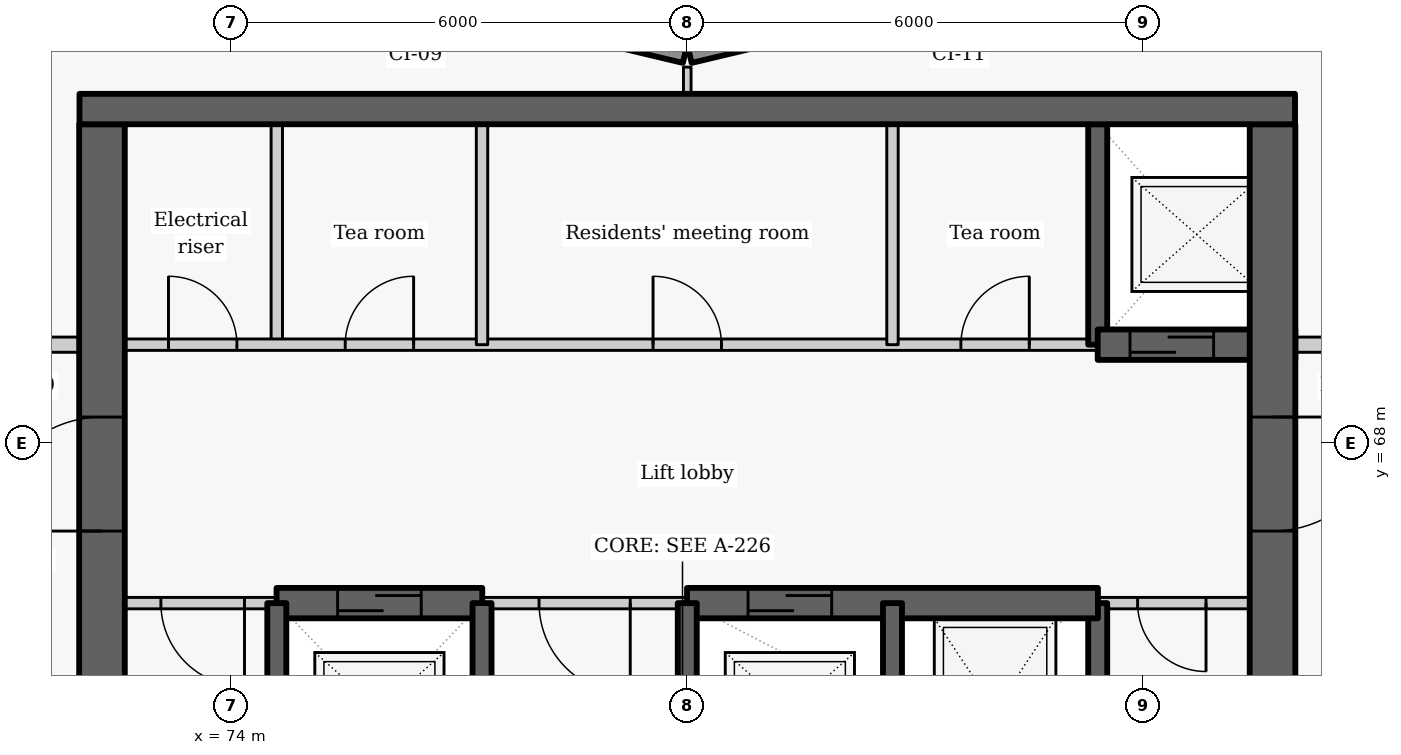
"""IFC4 building model, lengths in metres.
Left out: names, types, materials, properties, quantities, classifications, styles, units other than length and angle.
Written with IfcOpenShell. Run it as: python <this file> out.ifc"""

import sys

from ifc_helpers import new_model, si_unit, direction, frame, frame_2d, origin, place, context, subcontext, project, spatial, rectangle, extrude, element, fill, save


model = new_model("IFC4")
c1 = context("Model", 3, precision=1e-05, world=origin(), true_north=direction((0.0, 1.0)))
c2 = subcontext(c1, "Body", "Model", "MODEL_VIEW")
j1 = project(units=[si_unit("LENGTHUNIT", "METRE"), si_unit("PLANEANGLEUNIT", "RADIAN")], contexts=[c1])
p1 = place(None, origin())
s1 = spatial("IfcSite", under=j1, at=p1, CompositionType="ELEMENT")
p2 = place(p1, origin())
s2 = spatial("IfcBuilding", under=s1, at=p2, CompositionType="ELEMENT")
p3 = place(p2, frame((0.0, 0.0, 140.4)))
s3 = spatial("IfcBuildingStorey", under=s2, at=p3, CompositionType="ELEMENT", Elevation=140.4)
p4 = place(p3, frame((83.186, 73.881, 0.0), z_axis=(0.0, 0.0, 1.0), x_axis=(-0.972773113459, -0.231759508395, 0.0)))
e1 = element("IfcWall", 1, at=p4, inside=s3, PredefinedType="SOLIDWALL", context=c2, shape_type="SweptSolid", body=[
    extrude(rectangle(XDim=3.246, YDim=0.25, at=frame_2d((1.623, 0.0))), origin(), (0.0, 0.0, 1.0), 2.425),
])
p5 = place(p4, frame((0.573, 0.0, 0.9)))
e2 = element("IfcOpeningElement", 2, at=p5, cuts=e1, PredefinedType="OPENING", context=c2, shape_type="SweptSolid", body=[
    extrude(rectangle(XDim=2.1, YDim=1.1, at=frame_2d((1.05, 0.55))), frame((0.0, 0.135, 0.0), z_axis=(0.0, -1.0, 0.0), x_axis=(1.0, 0.0, 0.0)), (0.0, 0.0, 1.0), 0.27),
])
p6 = place(p3, frame((79.971, 73.128, 0.0), z_axis=(0.0, 0.0, 1.0), x_axis=(-0.972773113459, 0.231759508395, 0.0)))
e3 = element("IfcWall", 3, at=p6, inside=s3, PredefinedType="SOLIDWALL", context=c2, shape_type="SweptSolid", body=[
    extrude(rectangle(XDim=3.246, YDim=0.25, at=frame_2d((1.623, 0.0))), origin(), (0.0, 0.0, 1.0), 2.425),
])
p7 = place(p6, frame((0.573, 0.0, 0.9)))
e4 = element("IfcOpeningElement", 4, at=p7, cuts=e3, PredefinedType="OPENING", context=c2, shape_type="SweptSolid", body=[
    extrude(rectangle(XDim=2.1, YDim=1.1, at=frame_2d((1.05, 0.55))), frame((0.0, 0.135, 0.0), z_axis=(0.0, -1.0, 0.0), x_axis=(1.0, 0.0, 0.0)), (0.0, 0.0, 1.0), 0.27),
])
p8 = place(p3, frame((74.6, 69.3, 0.0), z_axis=(0.0, 0.0, 1.0), x_axis=(0.0, 1.0, 0.0)))
e5 = element("IfcWall", 5, at=p8, inside=s3, PredefinedType="PARTITIONING", context=c2, shape_type="SweptSolid", body=[
    extrude(rectangle(XDim=2.9, YDim=0.15, at=frame_2d((1.45, 0.0))), origin(), (0.0, 0.0, 1.0), 3.025),
])
p9 = place(p3, frame((72.0, 69.3, 0.0), z_axis=(0.0, 0.0, 1.0), x_axis=(1.0, 0.0, 0.0)))
e6 = element("IfcWall", 6, at=p9, inside=s3, PredefinedType="PARTITIONING", context=c2, shape_type="SweptSolid", body=[
    extrude(rectangle(XDim=13.4, YDim=0.15, at=frame_2d((6.7, 0.0))), origin(), (0.0, 0.0, 1.0), 3.025),
])
p10 = place(p9, frame((1.175, 0.0, 0.0)))
e7 = element("IfcOpeningElement", 7, at=p10, cuts=e6, PredefinedType="OPENING", context=c2, shape_type="SweptSolid", body=[
    extrude(rectangle(XDim=0.9, YDim=2.1, at=frame_2d((0.45, 1.05))), frame((0.0, 0.085, 0.0), z_axis=(0.0, -1.0, 0.0), x_axis=(1.0, 0.0, 0.0)), (0.0, 0.0, 1.0), 0.17),
])
p11 = place(p9, frame((3.5, 0.0, 0.0)))
e8 = element("IfcOpeningElement", 8, at=p11, cuts=e6, PredefinedType="OPENING", context=c2, shape_type="SweptSolid", body=[
    extrude(rectangle(XDim=0.9, YDim=2.1, at=frame_2d((0.45, 1.05))), frame((0.0, 0.085, 0.0), z_axis=(0.0, -1.0, 0.0), x_axis=(1.0, 0.0, 0.0)), (0.0, 0.0, 1.0), 0.17),
])
p12 = place(p9, frame((7.55, 0.0, 0.0)))
e9 = element("IfcOpeningElement", 9, at=p12, cuts=e6, PredefinedType="OPENING", context=c2, shape_type="SweptSolid", body=[
    extrude(rectangle(XDim=0.9, YDim=2.1, at=frame_2d((0.45, 1.05))), frame((0.0, 0.085, 0.0), z_axis=(0.0, -1.0, 0.0), x_axis=(1.0, 0.0, 0.0)), (0.0, 0.0, 1.0), 0.17),
])
p13 = place(p9, frame((11.6, 0.0, 0.0)))
e10 = element("IfcOpeningElement", 10, at=p13, cuts=e6, PredefinedType="OPENING", context=c2, shape_type="SweptSolid", body=[
    extrude(rectangle(XDim=0.9, YDim=2.1, at=frame_2d((0.45, 1.05))), frame((0.0, 0.085, 0.0), z_axis=(0.0, -1.0, 0.0), x_axis=(1.0, 0.0, 0.0)), (0.0, 0.0, 1.0), 0.17),
])
p14 = place(p3, frame((72.3, 63.1, -0.275), z_axis=(0.0, 0.0, 1.0), x_axis=(0.0, 1.0, 0.0)))
e11 = element("IfcWall", 11, at=p14, inside=s3, PredefinedType="SHEAR", context=c2, shape_type="SweptSolid", body=[
    extrude(rectangle(XDim=9.1, YDim=0.6, at=frame_2d((4.55, 0.0))), origin(), (0.0, 0.0, 1.0), 3.3),
])
p15 = place(p14, frame((3.748, 0.0, 0.275)))
e12 = element("IfcOpeningElement", 12, at=p15, cuts=e11, PredefinedType="OPENING", context=c2, shape_type="SweptSolid", body=[
    extrude(rectangle(XDim=1.5, YDim=2.1, at=frame_2d((0.75, 1.05))), frame((0.0, 0.31, 0.0), z_axis=(0.0, -1.0, 0.0), x_axis=(1.0, 0.0, 0.0)), (0.0, 0.0, 1.0), 0.62),
])
p16 = place(p3, frame((85.4, 63.1, -0.275), z_axis=(0.0, 0.0, 1.0), x_axis=(0.0, 1.0, 0.0)))
e13 = element("IfcWall", 13, at=p16, inside=s3, PredefinedType="SHEAR", context=c2, shape_type="SweptSolid", body=[
    extrude(rectangle(XDim=2.8, YDim=0.25, at=frame_2d((1.4, 0.0))), origin(), (0.0, 0.0, 1.0), 3.3),
])
p17 = place(p3, frame((85.4, 69.3, -0.275), z_axis=(0.0, 0.0, 1.0), x_axis=(0.0, 1.0, 0.0)))
e14 = element("IfcWall", 14, at=p17, inside=s3, PredefinedType="SHEAR", context=c2, shape_type="SweptSolid", body=[
    extrude(rectangle(XDim=2.9, YDim=0.25, at=frame_2d((1.45, 0.0))), origin(), (0.0, 0.0, 1.0), 3.3),
])
p18 = place(p3, frame((85.4, 69.3, -0.275), z_axis=(0.0, 0.0, 1.0), x_axis=(1.0, 0.0, 0.0)))
e15 = element("IfcWall", 15, at=p18, inside=s3, PredefinedType="SHEAR", context=c2, shape_type="SweptSolid", body=[
    extrude(rectangle(XDim=2.6, YDim=0.4, at=frame_2d((1.3, 0.0))), origin(), (0.0, 0.0, 1.0), 3.3),
])
p19 = place(p18, frame((0.425, 0.0, 0.275)))
e16 = element("IfcOpeningElement", 16, at=p19, cuts=e15, PredefinedType="OPENING", context=c2, shape_type="SweptSolid", body=[
    extrude(rectangle(XDim=1.1, YDim=2.1, at=frame_2d((0.55, 1.05))), frame((0.0, 0.21, 0.0), z_axis=(0.0, -1.0, 0.0), x_axis=(1.0, 0.0, 0.0)), (0.0, 0.0, 1.0), 0.42),
])
p20 = place(p3, frame((87.7, 72.2, -0.275), z_axis=(0.0, 0.0, 1.0), x_axis=(0.0, -1.0, 0.0)))
e17 = element("IfcWall", 17, at=p20, inside=s3, PredefinedType="SHEAR", context=c2, shape_type="SweptSolid", body=[
    extrude(rectangle(XDim=15.6, YDim=0.6, at=frame_2d((7.8, 0.0))), origin(), (0.0, 0.0, 1.0), 3.3),
])
p21 = place(p20, frame((3.852, 0.0, 0.275)))
e18 = element("IfcOpeningElement", 18, at=p21, cuts=e17, PredefinedType="OPENING", context=c2, shape_type="SweptSolid", body=[
    extrude(rectangle(XDim=1.5, YDim=2.1, at=frame_2d((0.75, 1.05))), frame((0.0, 0.31, 0.0), z_axis=(0.0, -1.0, 0.0), x_axis=(1.0, 0.0, 0.0)), (0.0, 0.0, 1.0), 0.62),
])
for number, where, z_axis, x_axis in (
    (19, (77.3, 69.3, 0.0), (0.0, 0.0, 1.0), (0.0, 1.0, 0.0)),
    (20, (82.7, 69.3, 0.0), (0.0, 0.0, 1.0), (0.0, 1.0, 0.0)),
):
    element("IfcWall", number, at=place(p3, frame(where, z_axis=z_axis, x_axis=x_axis)), inside=s3, PredefinedType="PARTITIONING", context=c2, shape_type="SweptSolid", body=[
        extrude(rectangle(XDim=2.9, YDim=0.15, at=frame_2d((1.45, 0.0))), origin(), (0.0, 0.0, 1.0), 3.025),
    ])
p22 = place(p3, frame((74.603, 65.9, 0.0), z_axis=(0.0, 0.0, 1.0), x_axis=(-1.0, 0.0, 0.0)))
e21 = element("IfcWall", 21, at=p22, inside=s3, PredefinedType="PARTITIONING", context=c2, shape_type="SweptSolid", body=[
    extrude(rectangle(XDim=2.603, YDim=0.15, at=frame_2d((1.302, 0.0))), origin(), (0.0, 0.0, 1.0), 3.025),
])
p23 = place(p22, frame((0.428, 0.0, 0.0)))
e22 = element("IfcOpeningElement", 22, at=p23, cuts=e21, PredefinedType="OPENING", context=c2, shape_type="SweptSolid", body=[
    extrude(rectangle(XDim=1.1, YDim=2.1, at=frame_2d((0.55, 1.05))), frame((0.0, 0.085, 0.0), z_axis=(0.0, -1.0, 0.0), x_axis=(1.0, 0.0, 0.0)), (0.0, 0.0, 1.0), 0.17),
])
p24 = place(p3, frame((80.003, 65.9, 0.0), z_axis=(0.0, 0.0, 1.0), x_axis=(-1.0, 0.0, 0.0)))
e23 = element("IfcWall", 23, at=p24, inside=s3, PredefinedType="PARTITIONING", context=c2, shape_type="SweptSolid", body=[
    extrude(rectangle(XDim=2.706, YDim=0.15, at=frame_2d((1.353, 0.0))), origin(), (0.0, 0.0, 1.0), 3.025),
])
p25 = place(p24, frame((0.753, 0.0, 0.0)))
e24 = element("IfcOpeningElement", 24, at=p25, cuts=e23, PredefinedType="OPENING", context=c2, shape_type="SweptSolid", body=[
    extrude(rectangle(XDim=1.2, YDim=2.1, at=frame_2d((0.6, 1.05))), frame((0.0, 0.085, 0.0), z_axis=(0.0, -1.0, 0.0), x_axis=(1.0, 0.0, 0.0)), (0.0, 0.0, 1.0), 0.17),
])
p26 = place(p3, frame((88.0, 65.9, 0.0), z_axis=(0.0, 0.0, 1.0), x_axis=(-1.0, 0.0, 0.0)))
e25 = element("IfcWall", 25, at=p26, inside=s3, PredefinedType="PARTITIONING", context=c2, shape_type="SweptSolid", body=[
    extrude(rectangle(XDim=2.603, YDim=0.15, at=frame_2d((1.302, 0.0))), origin(), (0.0, 0.0, 1.0), 3.025),
])
p27 = place(p26, frame((1.175, 0.0, 0.0)))
e26 = element("IfcOpeningElement", 26, at=p27, cuts=e25, PredefinedType="OPENING", context=c2, shape_type="SweptSolid", body=[
    extrude(rectangle(XDim=0.9, YDim=2.1, at=frame_2d((0.45, 1.05))), frame((0.0, 0.085, 0.0), z_axis=(0.0, -1.0, 0.0), x_axis=(1.0, 0.0, 0.0)), (0.0, 0.0, 1.0), 0.17),
])
p28 = place(p3, frame((74.597, 65.9, -0.275), z_axis=(0.0, 0.0, 1.0), x_axis=(1.0, 0.0, 0.0)))
e27 = element("IfcWall", 27, at=p28, inside=s3, PredefinedType="SHEAR", context=c2, shape_type="SweptSolid", body=[
    extrude(rectangle(XDim=2.706, YDim=0.4, at=frame_2d((1.353, 0.0))), origin(), (0.0, 0.0, 1.0), 3.3),
])
p29 = place(p28, frame((0.803, 0.0, 0.275)))
e28 = element("IfcOpeningElement", 28, at=p29, cuts=e27, PredefinedType="OPENING", context=c2, shape_type="SweptSolid", body=[
    extrude(rectangle(XDim=1.1, YDim=2.1, at=frame_2d((0.55, 1.05))), frame((0.0, 0.21, 0.0), z_axis=(0.0, -1.0, 0.0), x_axis=(1.0, 0.0, 0.0)), (0.0, 0.0, 1.0), 0.42),
])
p30 = place(p3, frame((79.997, 65.9, -0.275), z_axis=(0.0, 0.0, 1.0), x_axis=(1.0, 0.0, 0.0)))
e29 = element("IfcWall", 29, at=p30, inside=s3, PredefinedType="SHEAR", context=c2, shape_type="SweptSolid", body=[
    extrude(rectangle(XDim=5.406, YDim=0.4, at=frame_2d((2.703, 0.0))), origin(), (0.0, 0.0, 1.0), 3.3),
])
p31 = place(p30, frame((0.803, 0.0, 0.275)))
e30 = element("IfcOpeningElement", 30, at=p31, cuts=e29, PredefinedType="OPENING", context=c2, shape_type="SweptSolid", body=[
    extrude(rectangle(XDim=1.1, YDim=2.1, at=frame_2d((0.55, 1.05))), frame((0.0, 0.21, 0.0), z_axis=(0.0, -1.0, 0.0), x_axis=(1.0, 0.0, 0.0)), (0.0, 0.0, 1.0), 0.42),
])
for number, where, z_axis, x_axis in (
    (31, (74.6, 63.1, -0.275), (0.0, 0.0, 1.0), (0.0, 1.0, 0.0)),
    (32, (77.3, 63.1, -0.275), (0.0, 0.0, 1.0), (0.0, 1.0, 0.0)),
    (33, (80.0, 63.1, -0.275), (0.0, 0.0, 1.0), (0.0, 1.0, 0.0)),
    (34, (82.7, 63.1, -0.275), (0.0, 0.0, 1.0), (0.0, 1.0, 0.0)),
):
    element("IfcWall", number, at=place(p3, frame(where, z_axis=z_axis, x_axis=x_axis)), inside=s3, PredefinedType="SHEAR", context=c2, shape_type="SweptSolid", body=[
        extrude(rectangle(XDim=2.8, YDim=0.25, at=frame_2d((1.4, 0.0))), origin(), (0.0, 0.0, 1.0), 3.3),
    ])
for number, where, z_axis, x_axis in (
    (35, (70.45, 69.3, 0.0), (0.0, 0.0, 1.0), (1.0, 0.0, 0.0)),
    (36, (88.0, 69.3, 0.0), (0.0, 0.0, 1.0), (1.0, 0.0, 0.0)),
):
    element("IfcWall", number, at=place(p3, frame(where, z_axis=z_axis, x_axis=x_axis)), inside=s3, PredefinedType="PARTITIONING", context=c2, shape_type="SweptSolid", body=[
        extrude(rectangle(XDim=1.55, YDim=0.2, at=frame_2d((0.775, 0.0))), origin(), (0.0, 0.0, 1.0), 3.025),
    ])
p32 = place(p3, frame((80.0, 72.6, 0.0), z_axis=(0.0, 0.0, 1.0), x_axis=(0.0, 1.0, 0.0)))
e37 = element("IfcWall", 37, at=p32, inside=s3, PredefinedType="PARTITIONING", context=c2, shape_type="SweptSolid", body=[
    extrude(rectangle(XDim=0.352, YDim=0.1, at=frame_2d((0.176, 0.0))), origin(), (0.0, 0.0, 1.0), 3.025),
])
p33 = place(p3, frame((72.004, 72.4, -0.275), z_axis=(0.0, 0.0, 1.0), x_axis=(1.0, 0.0, 0.0)))
e38 = element("IfcWall", 38, at=p33, inside=s3, PredefinedType="SHEAR", context=c2, shape_type="SweptSolid", body=[
    extrude(rectangle(XDim=15.992, YDim=0.4, at=frame_2d((7.996, 0.0))), origin(), (0.0, 0.0, 1.0), 3.3),
])
p34 = place(p10, origin())
e39 = element("IfcDoor", 39, at=p34, inside=s3, OperationType="SINGLE_SWING_LEFT", PredefinedType="DOOR", context=c2, shape_type="SweptSolid", body=[
    extrude(rectangle(XDim=0.9, YDim=2.1, at=frame_2d((0.45, 1.05))), frame((0.0, 0.025, 0.0), z_axis=(0.0, -1.0, 0.0), x_axis=(1.0, 0.0, 0.0)), (0.0, 0.0, 1.0), 0.05),
])
fill(e7, e39)
p35 = place(p19, origin())
e40 = element("IfcDoor", 40, at=p35, inside=s3, OperationType="SLIDING_TO_LEFT", PredefinedType="DOOR", context=c2, shape_type="SweptSolid", body=[
    extrude(rectangle(XDim=1.1, YDim=2.1, at=frame_2d((0.55, 1.05))), frame((0.0, 0.025, 0.0), z_axis=(0.0, -1.0, 0.0), x_axis=(1.0, 0.0, 0.0)), (0.0, 0.0, 1.0), 0.05),
])
fill(e16, e40)
p36 = place(p11, origin())
e41 = element("IfcDoor", 41, at=p36, inside=s3, OperationType="SINGLE_SWING_RIGHT", PredefinedType="DOOR", context=c2, shape_type="SweptSolid", body=[
    extrude(rectangle(XDim=0.9, YDim=2.1, at=frame_2d((0.45, 1.05))), frame((0.0, 0.025, 0.0), z_axis=(0.0, -1.0, 0.0), x_axis=(1.0, 0.0, 0.0)), (0.0, 0.0, 1.0), 0.05),
])
fill(e8, e41)
p37 = place(p12, origin())
e42 = element("IfcDoor", 42, at=p37, inside=s3, OperationType="SINGLE_SWING_LEFT", PredefinedType="DOOR", context=c2, shape_type="SweptSolid", body=[
    extrude(rectangle(XDim=0.9, YDim=2.1, at=frame_2d((0.45, 1.05))), frame((0.0, 0.025, 0.0), z_axis=(0.0, -1.0, 0.0), x_axis=(1.0, 0.0, 0.0)), (0.0, 0.0, 1.0), 0.05),
])
fill(e9, e42)
p38 = place(p13, origin())
e43 = element("IfcDoor", 43, at=p38, inside=s3, OperationType="SINGLE_SWING_RIGHT", PredefinedType="DOOR", context=c2, shape_type="SweptSolid", body=[
    extrude(rectangle(XDim=0.9, YDim=2.1, at=frame_2d((0.45, 1.05))), frame((0.0, 0.025, 0.0), z_axis=(0.0, -1.0, 0.0), x_axis=(1.0, 0.0, 0.0)), (0.0, 0.0, 1.0), 0.05),
])
fill(e10, e43)
p39 = place(p23, origin())
e44 = element("IfcDoor", 44, at=p39, inside=s3, OperationType="SINGLE_SWING_LEFT", PredefinedType="DOOR", context=c2, shape_type="SweptSolid", body=[
    extrude(rectangle(XDim=1.1, YDim=2.1, at=frame_2d((0.55, 1.05))), frame((0.0, 0.025, 0.0), z_axis=(0.0, -1.0, 0.0), x_axis=(1.0, 0.0, 0.0)), (0.0, 0.0, 1.0), 0.05),
])
fill(e22, e44)
p40 = place(p29, origin())
e45 = element("IfcDoor", 45, at=p40, inside=s3, OperationType="SLIDING_TO_LEFT", PredefinedType="DOOR", context=c2, shape_type="SweptSolid", body=[
    extrude(rectangle(XDim=1.1, YDim=2.1, at=frame_2d((0.55, 1.05))), frame((0.0, 0.025, 0.0), z_axis=(0.0, -1.0, 0.0), x_axis=(1.0, 0.0, 0.0)), (0.0, 0.0, 1.0), 0.05),
])
fill(e28, e45)
p41 = place(p25, origin())
e46 = element("IfcDoor", 46, at=p41, inside=s3, OperationType="DOUBLE_DOOR_SINGLE_SWING", PredefinedType="DOOR", context=c2, shape_type="SweptSolid", body=[
    extrude(rectangle(XDim=1.2, YDim=2.1, at=frame_2d((0.6, 1.05))), frame((0.0, 0.025, 0.0), z_axis=(0.0, -1.0, 0.0), x_axis=(1.0, 0.0, 0.0)), (0.0, 0.0, 1.0), 0.05),
])
fill(e24, e46)
p42 = place(p31, origin())
e47 = element("IfcDoor", 47, at=p42, inside=s3, OperationType="SLIDING_TO_LEFT", PredefinedType="DOOR", context=c2, shape_type="SweptSolid", body=[
    extrude(rectangle(XDim=1.1, YDim=2.1, at=frame_2d((0.55, 1.05))), frame((0.0, 0.025, 0.0), z_axis=(0.0, -1.0, 0.0), x_axis=(1.0, 0.0, 0.0)), (0.0, 0.0, 1.0), 0.05),
])
fill(e30, e47)
p43 = place(p27, origin())
e48 = element("IfcDoor", 48, at=p43, inside=s3, OperationType="SINGLE_SWING_LEFT", PredefinedType="DOOR", context=c2, shape_type="SweptSolid", body=[
    extrude(rectangle(XDim=0.9, YDim=2.1, at=frame_2d((0.45, 1.05))), frame((0.0, 0.025, 0.0), z_axis=(0.0, -1.0, 0.0), x_axis=(1.0, 0.0, 0.0)), (0.0, 0.0, 1.0), 0.05),
])
fill(e26, e48)
p44 = place(p21, origin())
e49 = element("IfcDoor", 49, at=p44, inside=s3, OperationType="DOUBLE_DOOR_SINGLE_SWING", PredefinedType="DOOR", context=c2, shape_type="SweptSolid", body=[
    extrude(rectangle(XDim=1.5, YDim=2.1, at=frame_2d((0.75, 1.05))), frame((0.0, 0.025, 0.0), z_axis=(0.0, -1.0, 0.0), x_axis=(1.0, 0.0, 0.0)), (0.0, 0.0, 1.0), 0.05),
])
fill(e18, e49)
p45 = place(p15, origin())
e50 = element("IfcDoor", 50, at=p45, inside=s3, OperationType="DOUBLE_DOOR_SINGLE_SWING", PredefinedType="DOOR", context=c2, shape_type="SweptSolid", body=[
    extrude(rectangle(XDim=1.5, YDim=2.1, at=frame_2d((0.75, 1.05))), frame((0.0, 0.025, 0.0), z_axis=(0.0, -1.0, 0.0), x_axis=(1.0, 0.0, 0.0)), (0.0, 0.0, 1.0), 0.05),
])
fill(e12, e50)
save(model, sys.argv[1])
